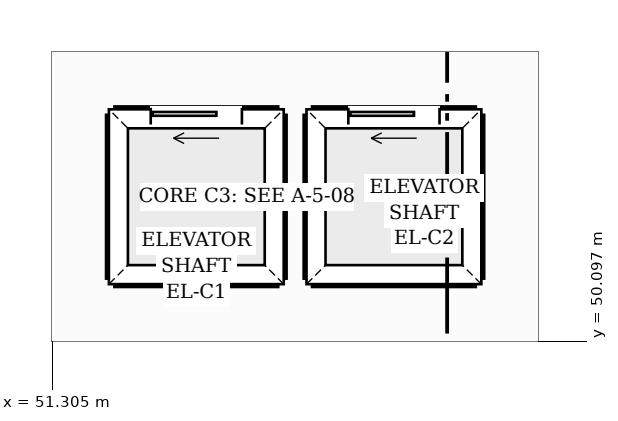
"""IFC4 building model, lengths in metres.
Left out: names, types, materials, properties, quantities, classifications, styles, units other than length and angle.
Written with IfcOpenShell. Run it as: python <this file> out.ifc"""

import sys

from ifc_helpers import new_model, si_unit, direction, frame, frame_2d, origin, place, context, subcontext, project, spatial, rectangle, extrude, element, fill, save


model = new_model("IFC4")
c1 = context("Model", 3, precision=1e-05, world=origin(), true_north=direction((0.0, 1.0)))
c2 = subcontext(c1, "Body", "Model", "MODEL_VIEW")
j1 = project(units=[si_unit("LENGTHUNIT", "METRE"), si_unit("PLANEANGLEUNIT", "RADIAN")], contexts=[c1])
p1 = place(None, origin())
s1 = spatial("IfcSite", under=j1, at=p1, CompositionType="ELEMENT")
p2 = place(p1, origin())
s2 = spatial("IfcBuilding", under=s1, at=p2, CompositionType="ELEMENT")
p3 = place(p2, frame((0.0, 0.0, -5.4)))
s3 = spatial("IfcBuildingStorey", under=s2, at=p3, CompositionType="ELEMENT", Elevation=-5.4)
p4 = place(p3, frame((52.14, 53.06, 0.0), z_axis=(0.0, 0.0, 1.0), x_axis=(1.0, 0.0, 0.0)))
e1 = element("IfcWall", 1, at=p4, inside=s3, PredefinedType="SHEAR", context=c2, shape_type="SweptSolid", body=[
    extrude(rectangle(XDim=2.12, YDim=0.22, at=frame_2d((1.06, 0.0))), origin(), (0.0, 0.0, 1.0), 5.12),
])
p5 = place(p4, frame((0.46, 0.0, 0.0)))
e2 = element("IfcOpeningElement", 2, at=p5, cuts=e1, PredefinedType="OPENING", context=c2, shape_type="SweptSolid", body=[
    extrude(rectangle(XDim=1.2, YDim=2.25, at=frame_2d((0.6, 1.125))), frame((0.0, 0.12, 0.0), z_axis=(0.0, -1.0, 0.0), x_axis=(1.0, 0.0, 0.0)), (0.0, 0.0, 1.0), 0.24),
])
for number, where, z_axis, x_axis in (
    (3, (52.14, 50.94, 0.0), (0.0, 0.0, 1.0), (1.0, 0.0, 0.0)),
    (4, (54.26, 50.94, 0.0), (0.0, 0.0, 1.0), (0.0, 1.0, 0.0)),
    (5, (52.14, 50.94, 0.0), (0.0, 0.0, 1.0), (0.0, 1.0, 0.0)),
):
    element("IfcWall", number, at=place(p3, frame(where, z_axis=z_axis, x_axis=x_axis)), inside=s3, PredefinedType="SHEAR", context=c2, shape_type="SweptSolid", body=[
        extrude(rectangle(XDim=2.12, YDim=0.22, at=frame_2d((1.06, 0.0))), origin(), (0.0, 0.0, 1.0), 5.12),
    ])
p6 = place(p3, frame((54.74, 53.06, 0.0), z_axis=(0.0, 0.0, 1.0), x_axis=(1.0, 0.0, 0.0)))
e6 = element("IfcWall", 6, at=p6, inside=s3, PredefinedType="SHEAR", context=c2, shape_type="SweptSolid", body=[
    extrude(rectangle(XDim=2.12, YDim=0.22, at=frame_2d((1.06, 0.0))), origin(), (0.0, 0.0, 1.0), 5.12),
])
p7 = place(p6, frame((0.46, 0.0, 0.0)))
e7 = element("IfcOpeningElement", 7, at=p7, cuts=e6, PredefinedType="OPENING", context=c2, shape_type="SweptSolid", body=[
    extrude(rectangle(XDim=1.2, YDim=2.25, at=frame_2d((0.6, 1.125))), frame((0.0, 0.12, 0.0), z_axis=(0.0, -1.0, 0.0), x_axis=(1.0, 0.0, 0.0)), (0.0, 0.0, 1.0), 0.24),
])
for number, where, z_axis, x_axis in (
    (8, (54.74, 50.94, 0.0), (0.0, 0.0, 1.0), (1.0, 0.0, 0.0)),
    (9, (56.86, 50.94, 0.0), (0.0, 0.0, 1.0), (0.0, 1.0, 0.0)),
    (10, (54.74, 50.94, 0.0), (0.0, 0.0, 1.0), (0.0, 1.0, 0.0)),
):
    element("IfcWall", number, at=place(p3, frame(where, z_axis=z_axis, x_axis=x_axis)), inside=s3, PredefinedType="SHEAR", context=c2, shape_type="SweptSolid", body=[
        extrude(rectangle(XDim=2.12, YDim=0.22, at=frame_2d((1.06, 0.0))), origin(), (0.0, 0.0, 1.0), 5.12),
    ])
p8 = place(p5, origin())
e11 = element("IfcDoor", 11, at=p8, inside=s3, OperationType="SLIDING_TO_LEFT", PredefinedType="DOOR", context=c2, shape_type="SweptSolid", body=[
    extrude(rectangle(XDim=1.2, YDim=2.25, at=frame_2d((0.6, 1.125))), frame((0.0, 0.025, 0.0), z_axis=(0.0, -1.0, 0.0), x_axis=(1.0, 0.0, 0.0)), (0.0, 0.0, 1.0), 0.05),
])
fill(e2, e11)
p9 = place(p7, origin())
e12 = element("IfcDoor", 12, at=p9, inside=s3, OperationType="SLIDING_TO_LEFT", PredefinedType="DOOR", context=c2, shape_type="SweptSolid", body=[
    extrude(rectangle(XDim=1.2, YDim=2.25, at=frame_2d((0.6, 1.125))), frame((0.0, 0.025, 0.0), z_axis=(0.0, -1.0, 0.0), x_axis=(1.0, 0.0, 0.0)), (0.0, 0.0, 1.0), 0.05),
])
fill(e7, e12)
save(model, sys.argv[1])
